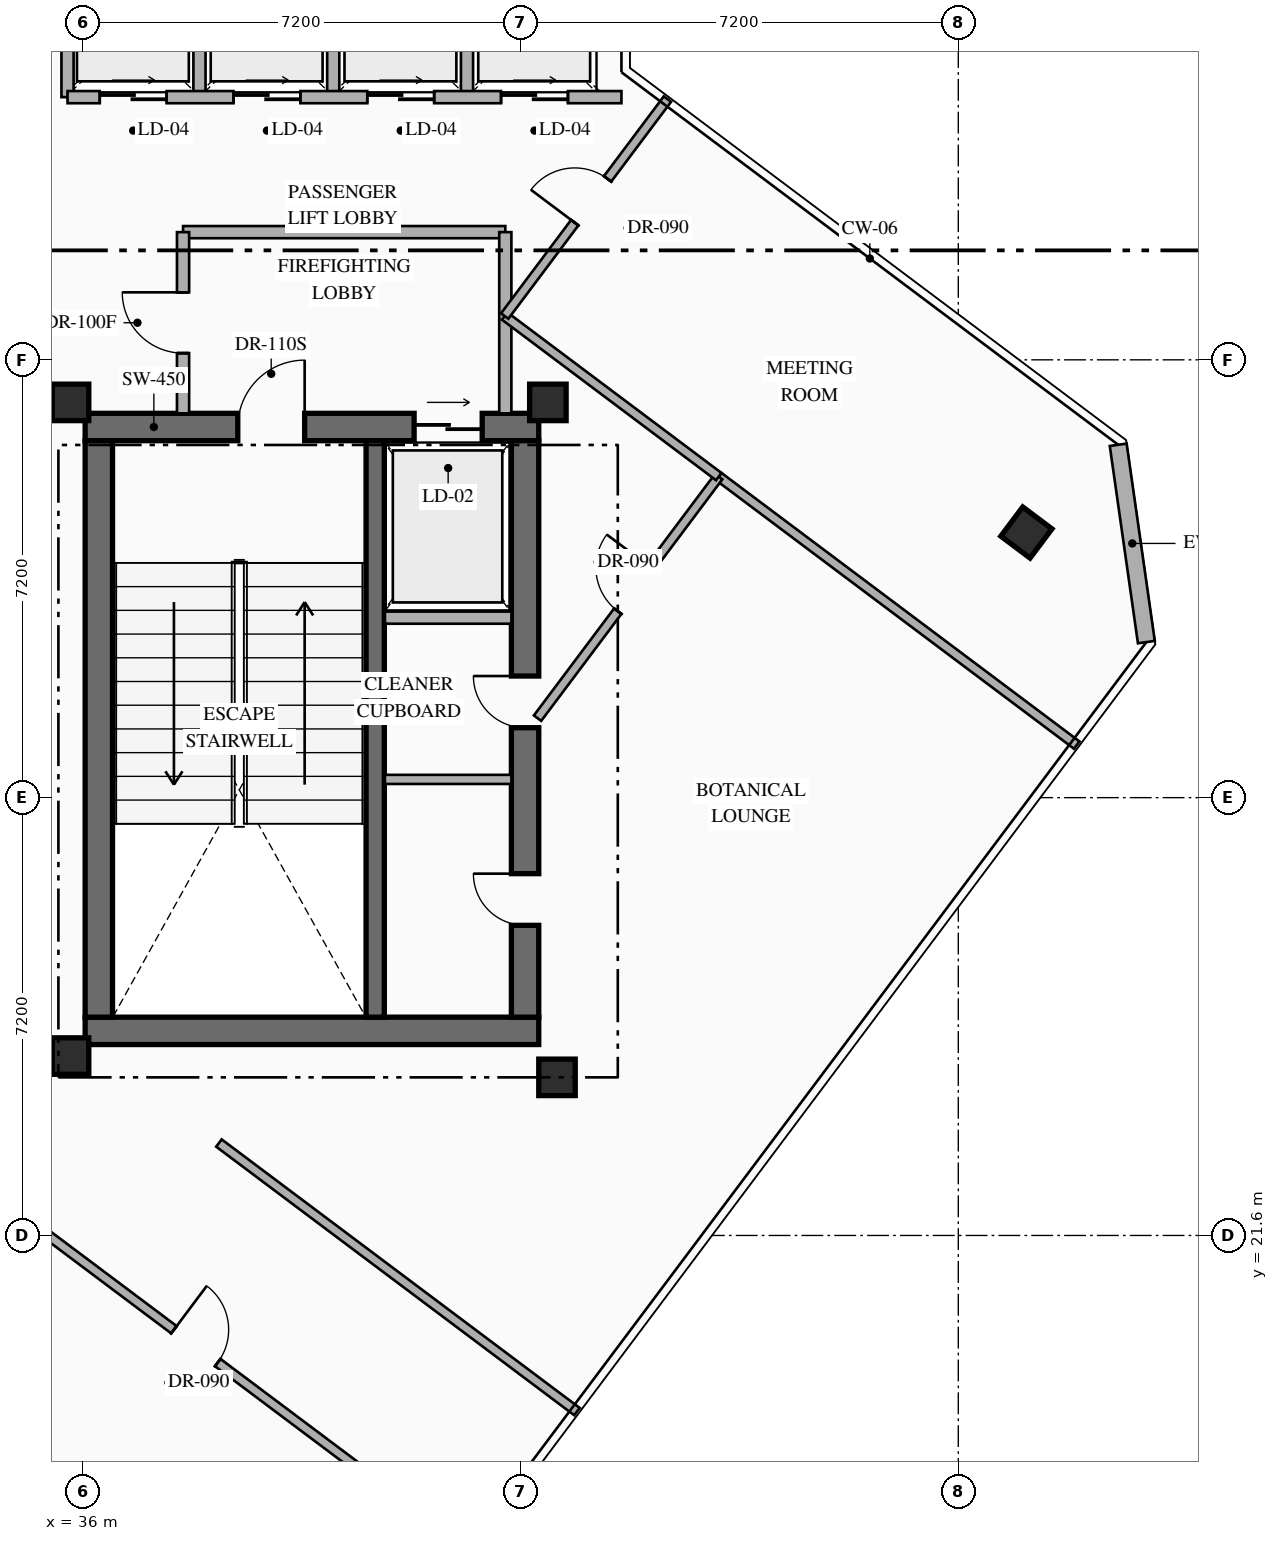
"""IFC4 building model, lengths in metres.
Left out: names, types, materials, properties, quantities, classifications, styles, units other than length and angle.
Written with IfcOpenShell. Run it as: python <this file> out.ifc"""

import sys

from ifc_helpers import new_model, si_unit, direction, frame, frame_2d, origin, origin_2d, place, context, subcontext, project, spatial, rectangle, hollow_rectangle, extrude, element, fill, save


model = new_model("IFC4")
c1 = context("Model", 3, precision=1e-05, world=origin(), true_north=direction((0.0, 1.0)))
c2 = subcontext(c1, "Body", "Model", "MODEL_VIEW")
j1 = project(units=[si_unit("LENGTHUNIT", "METRE"), si_unit("PLANEANGLEUNIT", "RADIAN")], contexts=[c1])
p1 = place(None, origin())
s1 = spatial("IfcSite", under=j1, at=p1, CompositionType="ELEMENT")
p2 = place(p1, origin())
s2 = spatial("IfcBuilding", under=s1, at=p2, CompositionType="ELEMENT")
p3 = place(p2, frame((0.0, 0.0, 265.95)))
s3 = spatial("IfcBuildingStorey", under=s2, at=p3, CompositionType="ELEMENT", Elevation=265.95)
p4 = place(p3, frame((36.04, 24.965, 0.0), z_axis=(0.0, 0.0, 1.0), x_axis=(1.0, 0.0, 0.0)))
e1 = element("IfcWall", 1, at=p4, inside=s3, PredefinedType="SHEAR", context=c2, shape_type="SweptSolid", body=[
    extrude(rectangle(XDim=7.46, YDim=0.45, at=frame_2d((3.73, 0.0))), origin(), (0.0, 0.0, 1.0), 4.0),
])
p5 = place(p3, frame((36.04, 34.895, 0.0), z_axis=(0.0, 0.0, 1.0), x_axis=(1.0, 0.0, 0.0)))
e2 = element("IfcWall", 2, at=p5, inside=s3, PredefinedType="SHEAR", context=c2, shape_type="SweptSolid", body=[
    extrude(rectangle(XDim=7.46, YDim=0.45, at=frame_2d((3.73, 0.0))), origin(), (0.0, 0.0, 1.0), 4.0),
])
p6 = place(p5, frame((2.51, 0.0, 0.0)))
e3 = element("IfcOpeningElement", 3, at=p6, cuts=e2, PredefinedType="OPENING", context=c2, shape_type="SweptSolid", body=[
    extrude(rectangle(XDim=1.1, YDim=2.2, at=frame_2d((0.55, 1.1))), frame((0.0, 0.235, 0.0), z_axis=(0.0, -1.0, 0.0), x_axis=(1.0, 0.0, 0.0)), (0.0, 0.0, 1.0), 0.47),
])
p7 = place(p5, frame((5.41, 0.0, 0.0)))
e4 = element("IfcOpeningElement", 4, at=p7, cuts=e2, PredefinedType="OPENING", context=c2, shape_type="SweptSolid", body=[
    extrude(rectangle(XDim=1.12, YDim=2.15, at=frame_2d((0.56, 1.075))), frame((0.0, 0.235, 0.0), z_axis=(0.0, -1.0, 0.0), x_axis=(1.0, 0.0, 0.0)), (0.0, 0.0, 1.0), 0.47),
])
p8 = place(p3, frame((36.265, 25.19, 0.0), z_axis=(0.0, 0.0, 1.0), x_axis=(0.0, 1.0, 0.0)))
e5 = element("IfcWall", 5, at=p8, inside=s3, PredefinedType="SHEAR", context=c2, shape_type="SweptSolid", body=[
    extrude(rectangle(XDim=9.48, YDim=0.45, at=frame_2d((4.74, 0.0))), origin(), (0.0, 0.0, 1.0), 4.0),
])
p9 = place(p3, frame((43.275, 25.19, 0.0), z_axis=(0.0, 0.0, 1.0), x_axis=(0.0, 1.0, 0.0)))
e6 = element("IfcWall", 6, at=p9, inside=s3, PredefinedType="SHEAR", context=c2, shape_type="SweptSolid", body=[
    extrude(rectangle(XDim=9.48, YDim=0.45, at=frame_2d((4.74, 0.0))), origin(), (0.0, 0.0, 1.0), 4.0),
])
p10 = place(p9, frame((1.51, 0.0, 0.0)))
e7 = element("IfcOpeningElement", 7, at=p10, cuts=e6, PredefinedType="OPENING", context=c2, shape_type="SweptSolid", body=[
    extrude(rectangle(XDim=0.85, YDim=2.08, at=frame_2d((0.425, 1.04))), frame((0.0, 0.235, 0.0), z_axis=(0.0, -1.0, 0.0), x_axis=(1.0, 0.0, 0.0)), (0.0, 0.0, 1.0), 0.47),
])
p11 = place(p9, frame((4.76, 0.0, 0.0)))
e8 = element("IfcOpeningElement", 8, at=p11, cuts=e6, PredefinedType="OPENING", context=c2, shape_type="SweptSolid", body=[
    extrude(rectangle(XDim=0.85, YDim=2.08, at=frame_2d((0.425, 1.04))), frame((0.0, 0.235, 0.0), z_axis=(0.0, -1.0, 0.0), x_axis=(1.0, 0.0, 0.0)), (0.0, 0.0, 1.0), 0.47),
])
p12 = place(p3, frame((40.81, 25.19, 0.0), z_axis=(0.0, 0.0, 1.0), x_axis=(0.0, 1.0, 0.0)))
e9 = element("IfcWall", 9, at=p12, inside=s3, PredefinedType="SHEAR", context=c2, shape_type="SweptSolid", body=[
    extrude(rectangle(XDim=9.48, YDim=0.3, at=frame_2d((4.74, 0.0))), origin(), (0.0, 0.0, 1.0), 4.0),
])
for number, where, z_axis, x_axis in (
    (10, (35.8, 24.55, 0.0), (0.0, 0.0, 1.0), (1.0, 0.0, 0.0)),
    (11, (43.8, 24.2, 0.0), (0.0, 0.0, 1.0), (1.0, 0.0, 0.0)),
    (12, (35.8, 35.3, 0.0), (0.0, 0.0, 1.0), (1.0, 0.0, 0.0)),
    (13, (43.65, 35.3, 0.0), (0.0, 0.0, 1.0), (1.0, 0.0, 0.0)),
    (14, (51.52, 33.16, 0.0), (0.0, 0.0, 1.0), (0.8, -0.6, 0.0)),
):
    element("IfcColumn", number, at=place(p3, frame(where, z_axis=z_axis, x_axis=x_axis)), inside=s3, PredefinedType="COLUMN", context=c2, shape_type="SweptSolid", body=[
        extrude(hollow_rectangle(XDim=0.6, YDim=0.6, WallThickness=0.025, at=origin_2d()), origin(), (0.0, 0.0, 1.0), 4.0),
    ])
p13 = place(p3, frame((53.03, 34.603, 0.0), z_axis=(0.0, 0.0, 1.0), x_axis=(0.141212810973, -0.989979263428, 0.0)))
e15 = element("IfcWall", 15, at=p13, inside=s3, PredefinedType="STANDARD", context=c2, shape_type="SweptSolid", body=[
    extrude(rectangle(XDim=3.278, YDim=0.28, at=frame_2d((1.639, 0.0))), origin(), (0.0, 0.0, 1.0), 3.75),
])
p14 = place(p3, frame((40.97, 31.76, 0.0), z_axis=(0.0, 0.0, 1.0), x_axis=(1.0, 0.0, 0.0)))
e16 = element("IfcWall", 16, at=p14, inside=s3, PredefinedType="STANDARD", context=c2, shape_type="SweptSolid", body=[
    extrude(rectangle(XDim=2.08, YDim=0.2, at=frame_2d((1.04, 0.0))), origin(), (0.0, 0.0, 1.0), 3.75),
])
p15 = place(p3, frame((40.97, 29.1, 0.0), z_axis=(0.0, 0.0, 1.0), x_axis=(1.0, 0.0, 0.0)))
e17 = element("IfcWall", 17, at=p15, inside=s3, PredefinedType="PARTITIONING", context=c2, shape_type="SweptSolid", body=[
    extrude(rectangle(XDim=2.08, YDim=0.15, at=frame_2d((1.04, 0.0))), origin(), (0.0, 0.0, 1.0), 3.75),
])
p16 = place(p3, frame((37.65, 38.1, 0.0), z_axis=(0.0, 0.0, 1.0), x_axis=(1.0, 0.0, 0.0)))
e18 = element("IfcWall", 18, at=p16, inside=s3, PredefinedType="STANDARD", context=c2, shape_type="SweptSolid", body=[
    extrude(rectangle(XDim=5.3, YDim=0.2, at=frame_2d((2.65, 0.0))), origin(), (0.0, 0.0, 1.0), 3.75),
])
p17 = place(p3, frame((42.95, 35.12, 0.0), z_axis=(0.0, 0.0, 1.0), x_axis=(0.0, 1.0, 0.0)))
e19 = element("IfcWall", 19, at=p17, inside=s3, PredefinedType="STANDARD", context=c2, shape_type="SweptSolid", body=[
    extrude(rectangle(XDim=2.98, YDim=0.2, at=frame_2d((1.49, 0.0))), origin(), (0.0, 0.0, 1.0), 3.75),
])
p18 = place(p3, frame((37.65, 35.12, 0.0), z_axis=(0.0, 0.0, 1.0), x_axis=(0.0, 1.0, 0.0)))
e20 = element("IfcWall", 20, at=p18, inside=s3, PredefinedType="STANDARD", context=c2, shape_type="SweptSolid", body=[
    extrude(rectangle(XDim=2.98, YDim=0.2, at=frame_2d((1.49, 0.0))), origin(), (0.0, 0.0, 1.0), 3.75),
])
p19 = place(p18, frame((0.99, 0.0, 0.0)))
e21 = element("IfcOpeningElement", 21, at=p19, cuts=e20, PredefinedType="OPENING", context=c2, shape_type="SweptSolid", body=[
    extrude(rectangle(XDim=1.0, YDim=2.2, at=frame_2d((0.5, 1.1))), frame((0.0, 0.11, 0.0), z_axis=(0.0, -1.0, 0.0), x_axis=(1.0, 0.0, 0.0)), (0.0, 0.0, 1.0), 0.22),
])
for number, where, z_axis, x_axis in (
    (22, (35.75, 40.32, 0.0), (0.0, 0.0, 1.0), (0.0, 1.0, 0.0)),
    (23, (37.92, 40.32, 0.0), (0.0, 0.0, 1.0), (0.0, 1.0, 0.0)),
    (24, (40.12, 40.32, 0.0), (0.0, 0.0, 1.0), (0.0, 1.0, 0.0)),
    (25, (42.32, 40.32, 0.0), (0.0, 0.0, 1.0), (0.0, 1.0, 0.0)),
):
    element("IfcWall", number, at=place(p3, frame(where, z_axis=z_axis, x_axis=x_axis)), inside=s3, PredefinedType="STANDARD", context=c2, shape_type="SweptSolid", body=[
        extrude(rectangle(XDim=2.16, YDim=0.2, at=frame_2d((1.08, 0.0))), origin(), (0.0, 0.0, 1.0), 3.75),
    ])
p20 = place(p3, frame((35.75, 40.32, 0.0), z_axis=(0.0, 0.0, 1.0), x_axis=(1.0, 0.0, 0.0)))
e26 = element("IfcWall", 26, at=p20, inside=s3, PredefinedType="STANDARD", context=c2, shape_type="SweptSolid", body=[
    extrude(rectangle(XDim=9.11, YDim=0.2, at=frame_2d((4.555, 0.0))), origin(), (0.0, 0.0, 1.0), 3.75),
])
p21 = place(p20, frame((0.53, 0.0, 0.0)))
e27 = element("IfcOpeningElement", 27, at=p21, cuts=e26, PredefinedType="OPENING", context=c2, shape_type="SweptSolid", body=[
    extrude(rectangle(XDim=1.1, YDim=2.18, at=frame_2d((0.55, 1.09))), frame((0.0, 0.11, 0.0), z_axis=(0.0, -1.0, 0.0), x_axis=(1.0, 0.0, 0.0)), (0.0, 0.0, 1.0), 0.22),
])
p22 = place(p20, frame((2.73, 0.0, 0.0)))
e28 = element("IfcOpeningElement", 28, at=p22, cuts=e26, PredefinedType="OPENING", context=c2, shape_type="SweptSolid", body=[
    extrude(rectangle(XDim=1.1, YDim=2.18, at=frame_2d((0.55, 1.09))), frame((0.0, 0.11, 0.0), z_axis=(0.0, -1.0, 0.0), x_axis=(1.0, 0.0, 0.0)), (0.0, 0.0, 1.0), 0.22),
])
p23 = place(p20, frame((4.93, 0.0, 0.0)))
e29 = element("IfcOpeningElement", 29, at=p23, cuts=e26, PredefinedType="OPENING", context=c2, shape_type="SweptSolid", body=[
    extrude(rectangle(XDim=1.1, YDim=2.18, at=frame_2d((0.55, 1.09))), frame((0.0, 0.11, 0.0), z_axis=(0.0, -1.0, 0.0), x_axis=(1.0, 0.0, 0.0)), (0.0, 0.0, 1.0), 0.22),
])
p24 = place(p20, frame((7.13, 0.0, 0.0)))
e30 = element("IfcOpeningElement", 30, at=p24, cuts=e26, PredefinedType="OPENING", context=c2, shape_type="SweptSolid", body=[
    extrude(rectangle(XDim=1.1, YDim=2.18, at=frame_2d((0.55, 1.09))), frame((0.0, 0.11, 0.0), z_axis=(0.0, -1.0, 0.0), x_axis=(1.0, 0.0, 0.0)), (0.0, 0.0, 1.0), 0.22),
])
p25 = place(p3, frame((28.18, 27.04, 0.0), z_axis=(0.0, 0.0, 1.0), x_axis=(0.8, -0.6, 0.0)))
e31 = element("IfcWall", 31, at=p25, inside=s3, PredefinedType="PARTITIONING", context=c2, shape_type="SweptSolid", body=[
    extrude(rectangle(XDim=17.76, YDim=0.15, at=frame_2d((8.88, 0.0))), origin(), (0.0, 0.0, 1.0), 3.75),
])
p26 = place(p25, frame((11.65, 0.0, 0.0)))
e32 = element("IfcOpeningElement", 32, at=p26, cuts=e31, PredefinedType="OPENING", context=c2, shape_type="SweptSolid", body=[
    extrude(rectangle(XDim=0.9, YDim=2.15, at=frame_2d((0.45, 1.075))), frame((0.0, 0.085, 0.0), z_axis=(0.0, -1.0, 0.0), x_axis=(1.0, 0.0, 0.0)), (0.0, 0.0, 1.0), 0.17),
])
for number, where, z_axis, x_axis in (
    (33, (38.24, 23.12, 0.0), (0.0, 0.0, 1.0), (0.8, -0.6, 0.0)),
    (34, (46.46, 34.08, 0.0), (0.0, 0.0, 1.0), (0.8, -0.6, 0.0)),
):
    element("IfcWall", number, at=place(p3, frame(where, z_axis=z_axis, x_axis=x_axis)), inside=s3, PredefinedType="PARTITIONING", context=c2, shape_type="SweptSolid", body=[
        extrude(rectangle(XDim=7.36, YDim=0.15, at=frame_2d((3.68, 0.0))), origin(), (0.0, 0.0, 1.0), 3.75),
    ])
p27 = place(p3, frame((43.48, 30.107, 0.0), z_axis=(0.0, 0.0, 1.0), x_axis=(0.600015730265, 0.799988202059, 0.0)))
e35 = element("IfcWall", 35, at=p27, inside=s3, PredefinedType="PARTITIONING", context=c2, shape_type="SweptSolid", body=[
    extrude(rectangle(XDim=4.967, YDim=0.15, at=frame_2d((2.483, 0.0))), origin(), (0.0, 0.0, 1.0), 3.75),
])
p28 = place(p27, frame((2.199, 0.0, 0.0)))
e36 = element("IfcOpeningElement", 36, at=p28, cuts=e35, PredefinedType="OPENING", context=c2, shape_type="SweptSolid", body=[
    extrude(rectangle(XDim=0.9, YDim=2.15, at=frame_2d((0.45, 1.075))), frame((0.0, 0.085, 0.0), z_axis=(0.0, -1.0, 0.0), x_axis=(1.0, 0.0, 0.0)), (0.0, 0.0, 1.0), 0.17),
])
p29 = place(p3, frame((42.94, 36.72, 0.0), z_axis=(0.0, 0.0, 1.0), x_axis=(0.800013316712, -0.599982243973, 0.0)))
e37 = element("IfcWall", 37, at=p29, inside=s3, PredefinedType="PARTITIONING", context=c2, shape_type="SweptSolid", body=[
    extrude(rectangle(XDim=4.4, YDim=0.15, at=frame_2d((2.2, 0.0))), origin(), (0.0, 0.0, 1.0), 3.295),
])
p30 = place(p3, frame((42.94, 36.72, 0.0), z_axis=(0.0, 0.0, 1.0), x_axis=(0.599991241767, 0.8000065686, 0.0)))
e38 = element("IfcWall", 38, at=p30, inside=s3, PredefinedType="PARTITIONING", context=c2, shape_type="SweptSolid", body=[
    extrude(rectangle(XDim=4.46, YDim=0.15, at=frame_2d((2.23, 0.0))), origin(), (0.0, 0.0, 1.0), 3.75),
])
p31 = place(p30, frame((1.92, 0.0, 0.0)))
e39 = element("IfcOpeningElement", 39, at=p31, cuts=e38, PredefinedType="OPENING", context=c2, shape_type="SweptSolid", body=[
    extrude(rectangle(XDim=0.9, YDim=2.15, at=frame_2d((0.45, 1.075))), frame((0.0, 0.085, 0.0), z_axis=(0.0, -1.0, 0.0), x_axis=(1.0, 0.0, 0.0)), (0.0, 0.0, 1.0), 0.17),
])
p32 = place(p6, origin())
e40 = element("IfcDoor", 40, at=p32, inside=s3, OperationType="SINGLE_SWING_RIGHT", PredefinedType="DOOR", context=c2, shape_type="SweptSolid", body=[
    extrude(rectangle(XDim=1.1, YDim=2.2, at=frame_2d((0.55, 1.1))), frame((0.0, 0.025, 0.0), z_axis=(0.0, -1.0, 0.0), x_axis=(1.0, 0.0, 0.0)), (0.0, 0.0, 1.0), 0.05),
])
fill(e3, e40)
p33 = place(p7, origin())
e41 = element("IfcDoor", 41, at=p33, inside=s3, OperationType="SLIDING_TO_RIGHT", PredefinedType="USERDEFINED", context=c2, shape_type="SweptSolid", body=[
    extrude(rectangle(XDim=1.12, YDim=2.15, at=frame_2d((0.56, 1.075))), frame((0.0, 0.025, 0.0), z_axis=(0.0, -1.0, 0.0), x_axis=(1.0, 0.0, 0.0)), (0.0, 0.0, 1.0), 0.05),
])
fill(e4, e41)
p34 = place(p10, origin())
e42 = element("IfcDoor", 42, at=p34, inside=s3, OperationType="SINGLE_SWING_RIGHT", PredefinedType="DOOR", context=c2, shape_type="SweptSolid", body=[
    extrude(rectangle(XDim=0.85, YDim=2.08, at=frame_2d((0.425, 1.04))), frame((0.0, 0.025, 0.0), z_axis=(0.0, -1.0, 0.0), x_axis=(1.0, 0.0, 0.0)), (0.0, 0.0, 1.0), 0.05),
])
fill(e7, e42)
p35 = place(p11, origin())
e43 = element("IfcDoor", 43, at=p35, inside=s3, OperationType="SINGLE_SWING_RIGHT", PredefinedType="DOOR", context=c2, shape_type="SweptSolid", body=[
    extrude(rectangle(XDim=0.85, YDim=2.08, at=frame_2d((0.425, 1.04))), frame((0.0, 0.025, 0.0), z_axis=(0.0, -1.0, 0.0), x_axis=(1.0, 0.0, 0.0)), (0.0, 0.0, 1.0), 0.05),
])
fill(e8, e43)
p36 = place(p19, origin())
e44 = element("IfcDoor", 44, at=p36, inside=s3, OperationType="SINGLE_SWING_RIGHT", PredefinedType="DOOR", context=c2, shape_type="SweptSolid", body=[
    extrude(rectangle(XDim=1.0, YDim=2.2, at=frame_2d((0.5, 1.1))), frame((0.0, 0.025, 0.0), z_axis=(0.0, -1.0, 0.0), x_axis=(1.0, 0.0, 0.0)), (0.0, 0.0, 1.0), 0.05),
])
fill(e21, e44)
p37 = place(p21, origin())
e45 = element("IfcDoor", 45, at=p37, inside=s3, OperationType="SLIDING_TO_RIGHT", PredefinedType="USERDEFINED", context=c2, shape_type="SweptSolid", body=[
    extrude(rectangle(XDim=1.1, YDim=2.18, at=frame_2d((0.55, 1.09))), frame((0.0, 0.025, 0.0), z_axis=(0.0, -1.0, 0.0), x_axis=(1.0, 0.0, 0.0)), (0.0, 0.0, 1.0), 0.05),
])
fill(e27, e45)
p38 = place(p22, origin())
e46 = element("IfcDoor", 46, at=p38, inside=s3, OperationType="SLIDING_TO_RIGHT", PredefinedType="USERDEFINED", context=c2, shape_type="SweptSolid", body=[
    extrude(rectangle(XDim=1.1, YDim=2.18, at=frame_2d((0.55, 1.09))), frame((0.0, 0.025, 0.0), z_axis=(0.0, -1.0, 0.0), x_axis=(1.0, 0.0, 0.0)), (0.0, 0.0, 1.0), 0.05),
])
fill(e28, e46)
p39 = place(p23, origin())
e47 = element("IfcDoor", 47, at=p39, inside=s3, OperationType="SLIDING_TO_RIGHT", PredefinedType="USERDEFINED", context=c2, shape_type="SweptSolid", body=[
    extrude(rectangle(XDim=1.1, YDim=2.18, at=frame_2d((0.55, 1.09))), frame((0.0, 0.025, 0.0), z_axis=(0.0, -1.0, 0.0), x_axis=(1.0, 0.0, 0.0)), (0.0, 0.0, 1.0), 0.05),
])
fill(e29, e47)
p40 = place(p24, origin())
e48 = element("IfcDoor", 48, at=p40, inside=s3, OperationType="SLIDING_TO_RIGHT", PredefinedType="USERDEFINED", context=c2, shape_type="SweptSolid", body=[
    extrude(rectangle(XDim=1.1, YDim=2.18, at=frame_2d((0.55, 1.09))), frame((0.0, 0.025, 0.0), z_axis=(0.0, -1.0, 0.0), x_axis=(1.0, 0.0, 0.0)), (0.0, 0.0, 1.0), 0.05),
])
fill(e30, e48)
p41 = place(p26, origin())
e49 = element("IfcDoor", 49, at=p41, inside=s3, OperationType="SINGLE_SWING_LEFT", PredefinedType="DOOR", context=c2, shape_type="SweptSolid", body=[
    extrude(rectangle(XDim=0.9, YDim=2.15, at=frame_2d((0.45, 1.075))), frame((0.0, 0.025, 0.0), z_axis=(0.0, -1.0, 0.0), x_axis=(1.0, 0.0, 0.0)), (0.0, 0.0, 1.0), 0.05),
])
fill(e32, e49)
p42 = place(p28, origin())
e50 = element("IfcDoor", 50, at=p42, inside=s3, OperationType="SINGLE_SWING_RIGHT", PredefinedType="DOOR", context=c2, shape_type="SweptSolid", body=[
    extrude(rectangle(XDim=0.9, YDim=2.15, at=frame_2d((0.45, 1.075))), frame((0.0, 0.025, 0.0), z_axis=(0.0, -1.0, 0.0), x_axis=(1.0, 0.0, 0.0)), (0.0, 0.0, 1.0), 0.05),
])
fill(e36, e50)
p43 = place(p31, origin())
e51 = element("IfcDoor", 51, at=p43, inside=s3, OperationType="SINGLE_SWING_LEFT", PredefinedType="DOOR", context=c2, shape_type="SweptSolid", body=[
    extrude(rectangle(XDim=0.9, YDim=2.15, at=frame_2d((0.45, 1.075))), frame((0.0, 0.025, 0.0), z_axis=(0.0, -1.0, 0.0), x_axis=(1.0, 0.0, 0.0)), (0.0, 0.0, 1.0), 0.05),
])
fill(e39, e51)
save(model, sys.argv[1])
